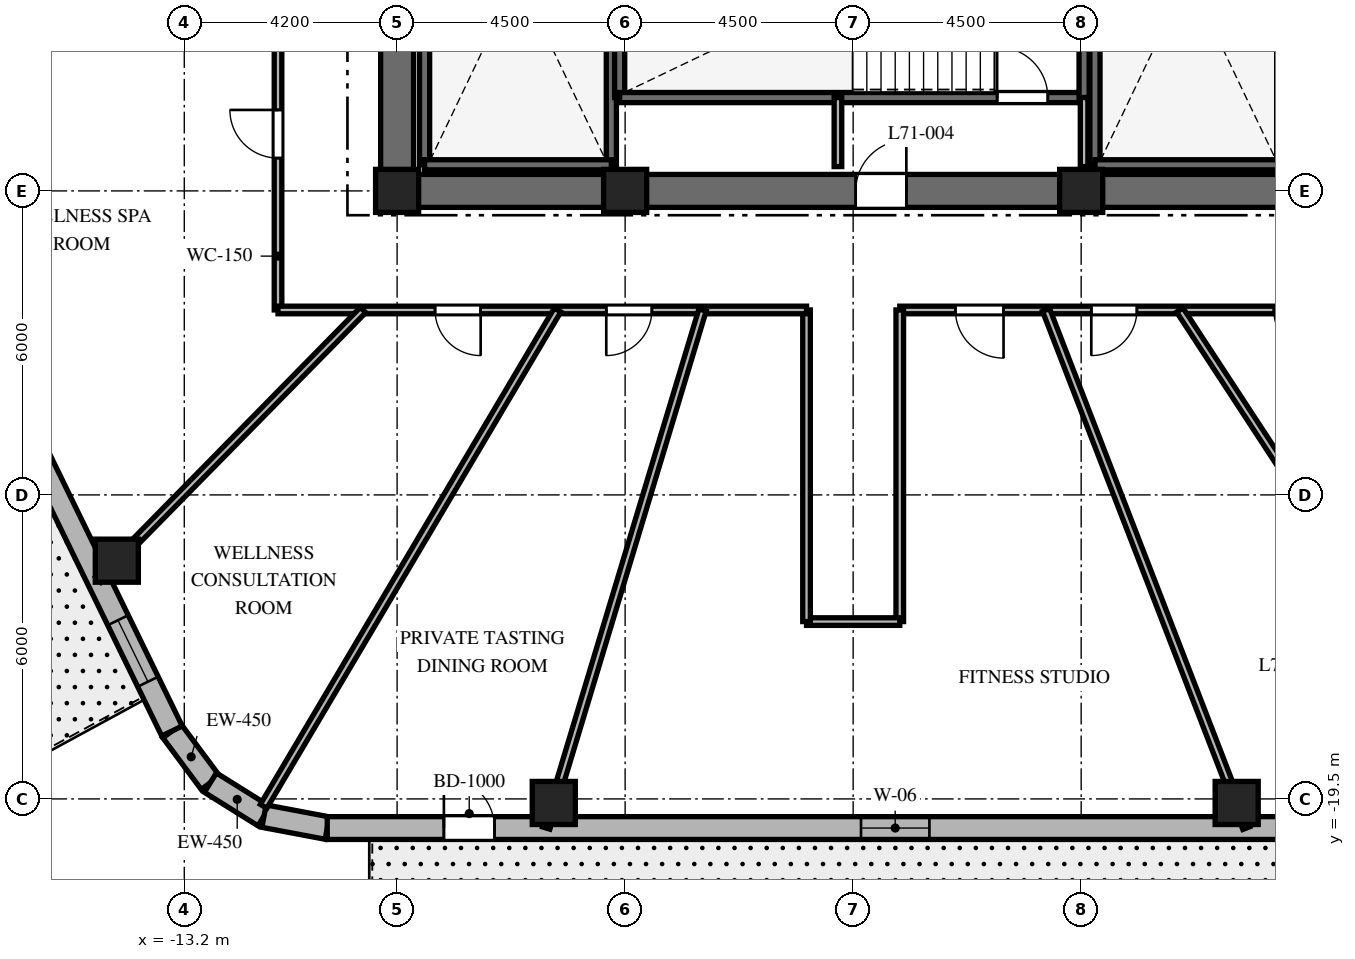
"""IFC4 building model, lengths in metres.
Left out: names, types, materials, properties, quantities, classifications, styles, units other than length and angle.
Written with IfcOpenShell. Run it as: python <this file> out.ifc"""

import sys

from ifc_helpers import new_model, si_unit, direction, frame, frame_2d, origin, origin_2d, place, context, subcontext, project, spatial, rectangle, extrude, element, fill, save


model = new_model("IFC4")
c1 = context("Model", 3, precision=1e-05, world=origin(), true_north=direction((0.0, 1.0)))
c2 = subcontext(c1, "Body", "Model", "MODEL_VIEW")
j1 = project(units=[si_unit("LENGTHUNIT", "METRE"), si_unit("PLANEANGLEUNIT", "RADIAN")], contexts=[c1])
p1 = place(None, origin())
s1 = spatial("IfcSite", under=j1, at=p1, CompositionType="ELEMENT")
p2 = place(p1, origin())
s2 = spatial("IfcBuilding", under=s1, at=p2, CompositionType="ELEMENT")
p3 = place(p2, frame((0.0, 0.0, 284.7)))
s3 = spatial("IfcBuildingStorey", under=s2, at=p3, CompositionType="ELEMENT", Elevation=284.7)
p4 = place(p3, frame((-9.325, -7.5, 0.0), z_axis=(0.0, 0.0, 1.0), x_axis=(1.0, 0.0, 0.0)))
e1 = element("IfcWall", 1, at=p4, inside=s3, PredefinedType="SHEAR", context=c2, shape_type="SweptSolid", body=[
    extrude(rectangle(XDim=18.65, YDim=0.65, at=frame_2d((9.325, 0.0))), origin(), (0.0, 0.0, 1.0), 3.9),
])
p5 = place(p4, frame((9.375, 0.0, 0.0)))
e2 = element("IfcOpeningElement", 2, at=p5, cuts=e1, PredefinedType="OPENING", context=c2, shape_type="SweptSolid", body=[
    extrude(rectangle(XDim=1.0, YDim=2.15, at=frame_2d((0.5, 1.075))), frame((0.0, 0.335, 0.0), z_axis=(0.0, -1.0, 0.0), x_axis=(1.0, 0.0, 0.0)), (0.0, 0.0, 1.0), 0.67),
])
p6 = place(p3, frame((-9.0, -7.175, 0.0), z_axis=(0.0, 0.0, 1.0), x_axis=(0.0, 1.0, 0.0)))
e3 = element("IfcWall", 3, at=p6, inside=s3, PredefinedType="SHEAR", context=c2, shape_type="SweptSolid", body=[
    extrude(rectangle(XDim=14.35, YDim=0.65, at=frame_2d((7.175, 0.0))), origin(), (0.0, 0.0, 1.0), 3.9),
])
p7 = place(p6, frame((10.3, 0.0, 0.0)))
e4 = element("IfcOpeningElement", 4, at=p7, cuts=e3, PredefinedType="OPENING", context=c2, shape_type="SweptSolid", body=[
    extrude(rectangle(XDim=1.05, YDim=2.15, at=frame_2d((0.525, 1.075))), frame((0.0, 0.335, 0.0), z_axis=(0.0, -1.0, 0.0), x_axis=(1.0, 0.0, 0.0)), (0.0, 0.0, 1.0), 0.67),
])
for number, where, z_axis, x_axis in (
    (5, (-8.458, -6.985, 0.0), (0.0, 0.0, 1.0), (0.0, 1.0, 0.0)),
    (6, (-4.772, -6.985, 0.0), (0.0, 0.0, 1.0), (0.0, 1.0, 0.0)),
):
    element("IfcWall", number, at=place(p3, frame(where, z_axis=z_axis, x_axis=x_axis)), inside=s3, PredefinedType="SHEAR", context=c2, shape_type="SweptSolid", body=[
        extrude(rectangle(XDim=9.143, YDim=0.2, at=frame_2d((4.572, 0.0))), origin(), (0.0, 0.0, 1.0), 3.9),
    ])
p8 = place(p3, frame((-8.458, -6.985, 0.0), z_axis=(0.0, 0.0, 1.0), x_axis=(1.0, 0.0, 0.0)))
e7 = element("IfcWall", 7, at=p8, inside=s3, PredefinedType="SHEAR", context=c2, shape_type="SweptSolid", body=[
    extrude(rectangle(XDim=3.686, YDim=0.2, at=frame_2d((1.843, 0.0))), origin(), (0.0, 0.0, 1.0), 3.9),
])
p9 = place(p3, frame((4.772, -6.985, 0.0), z_axis=(0.0, 0.0, 1.0), x_axis=(0.0, 1.0, 0.0)))
e8 = element("IfcWall", 8, at=p9, inside=s3, PredefinedType="SHEAR", context=c2, shape_type="SweptSolid", body=[
    extrude(rectangle(XDim=9.143, YDim=0.2, at=frame_2d((4.572, 0.0))), origin(), (0.0, 0.0, 1.0), 3.9),
])
for number, where, z_axis, x_axis in (
    (9, (4.772, -6.985, 0.0), (0.0, 0.0, 1.0), (1.0, 0.0, 0.0)),
    (10, (-4.608, -5.658, 0.0), (0.0, 0.0, 1.0), (0.0, 1.0, 0.0)),
):
    element("IfcWall", number, at=place(p3, frame(where, z_axis=z_axis, x_axis=x_axis)), inside=s3, PredefinedType="SHEAR", context=c2, shape_type="SweptSolid", body=[
        extrude(rectangle(XDim=3.686, YDim=0.2, at=frame_2d((1.843, 0.0))), origin(), (0.0, 0.0, 1.0), 3.9),
    ])
p10 = place(p3, frame((-4.608, -5.658, 0.0), z_axis=(0.0, 0.0, 1.0), x_axis=(1.0, 0.0, 0.0)))
e11 = element("IfcWall", 11, at=p10, inside=s3, PredefinedType="SHEAR", context=c2, shape_type="SweptSolid", body=[
    extrude(rectangle(XDim=9.166, YDim=0.2, at=frame_2d((4.583, 0.0))), origin(), (0.0, 0.0, 1.0), 3.9),
])
p11 = place(p10, frame((7.45, 0.0, 0.0)))
e12 = element("IfcOpeningElement", 12, at=p11, cuts=e11, PredefinedType="OPENING", context=c2, shape_type="SweptSolid", body=[
    extrude(rectangle(XDim=1.0, YDim=2.15, at=frame_2d((0.5, 1.075))), frame((0.0, 0.11, 0.0), z_axis=(0.0, -1.0, 0.0), x_axis=(1.0, 0.0, 0.0)), (0.0, 0.0, 1.0), 0.22),
])
p12 = place(p3, frame((4.558, -5.658, 0.0), z_axis=(0.0, 0.0, 1.0), x_axis=(0.0, 1.0, 0.0)))
e13 = element("IfcWall", 13, at=p12, inside=s3, PredefinedType="SHEAR", context=c2, shape_type="SweptSolid", body=[
    extrude(rectangle(XDim=3.686, YDim=0.2, at=frame_2d((1.843, 0.0))), origin(), (0.0, 0.0, 1.0), 3.9),
])
for number, where, z_axis, x_axis in (
    (14, (-9.0, -7.5, 0.0), (0.0, 0.0, 1.0), (1.0, 0.0, 0.0)),
    (15, (-4.5, -7.5, 0.0), (0.0, 0.0, 1.0), (1.0, 0.0, 0.0)),
    (16, (4.5, -7.5, 0.0), (0.0, 0.0, 1.0), (1.0, 0.0, 0.0)),
    (17, (-5.908, -19.58, 0.0), (0.0, 0.0, 1.0), (1.0, 0.0, 0.0)),
    (18, (7.569, -19.58, 0.0), (0.0, 0.0, 1.0), (1.0, 0.0, 0.0)),
    (19, (-14.531, -14.798, 0.0), (0.0, 0.0, 1.0), (1.0, 0.0, 0.0)),
):
    element("IfcColumn", number, at=place(p3, frame(where, z_axis=z_axis, x_axis=x_axis)), inside=s3, PredefinedType="COLUMN", context=c2, shape_type="SweptSolid", body=[
        extrude(rectangle(XDim=0.85, YDim=0.85, at=origin_2d()), origin(), (0.0, 0.0, 1.0), 3.9),
    ])
p13 = place(p3, frame((-13.443, -18.16, 0.0), z_axis=(0.0, 0.0, 1.0), x_axis=(0.597042425808, -0.802209661987, 0.0)))
e20 = element("IfcWall", 20, at=p13, inside=s3, PredefinedType="SOLIDWALL", context=c2, shape_type="SweptSolid", body=[
    extrude(rectangle(XDim=1.27, YDim=0.45, at=frame_2d((0.635, 0.0))), origin(), (0.0, 0.0, 1.0), 3.58),
])
p14 = place(p3, frame((-12.685, -19.178, 0.0), z_axis=(0.0, 0.0, 1.0), x_axis=(0.848031272749, -0.529946186362, 0.0)))
e21 = element("IfcWall", 21, at=p14, inside=s3, PredefinedType="SOLIDWALL", context=c2, shape_type="SweptSolid", body=[
    extrude(rectangle(XDim=1.248, YDim=0.45, at=frame_2d((0.624, 0.0))), origin(), (0.0, 0.0, 1.0), 3.58),
])
p15 = place(p3, frame((-11.626, -19.84, 0.0), z_axis=(0.0, 0.0, 1.0), x_axis=(0.982701956681, -0.185194126083, 0.0)))
e22 = element("IfcWall", 22, at=p15, inside=s3, PredefinedType="SOLIDWALL", context=c2, shape_type="SweptSolid", body=[
    extrude(rectangle(XDim=1.27, YDim=0.45, at=frame_2d((0.635, 0.0))), origin(), (0.0, 0.0, 1.0), 3.58),
])
p16 = place(p3, frame((-10.379, -20.075, 0.0), z_axis=(0.0, 0.0, 1.0), x_axis=(1.0, 0.0, 0.0)))
e23 = element("IfcWall", 23, at=p16, inside=s3, PredefinedType="SOLIDWALL", context=c2, shape_type="SweptSolid", body=[
    extrude(rectangle(XDim=22.417, YDim=0.45, at=frame_2d((11.208, 0.0))), origin(), (0.0, 0.0, 1.0), 3.58),
])
p17 = place(p16, frame((2.302, 0.0, 0.0)))
e24 = element("IfcOpeningElement", 24, at=p17, cuts=e23, PredefinedType="OPENING", context=c2, shape_type="SweptSolid", body=[
    extrude(rectangle(XDim=1.0, YDim=2.15, at=frame_2d((0.5, 1.075))), frame((0.0, 0.235, 0.0), z_axis=(0.0, -1.0, 0.0), x_axis=(1.0, 0.0, 0.0)), (0.0, 0.0, 1.0), 0.47),
])
p18 = place(p16, frame((10.534, 0.0, 0.8)))
e25 = element("IfcOpeningElement", 25, at=p18, cuts=e23, PredefinedType="OPENING", context=c2, shape_type="SweptSolid", body=[
    extrude(rectangle(XDim=1.35, YDim=1.75, at=frame_2d((0.675, 0.875))), frame((0.0, 0.235, 0.0), z_axis=(0.0, -1.0, 0.0), x_axis=(1.0, 0.0, 0.0)), (0.0, 0.0, 1.0), 0.47),
])
p19 = place(p16, frame((19.587, 0.0, 0.8)))
e26 = element("IfcOpeningElement", 26, at=p19, cuts=e23, PredefinedType="OPENING", context=c2, shape_type="SweptSolid", body=[
    extrude(rectangle(XDim=1.35, YDim=1.75, at=frame_2d((0.675, 0.875))), frame((0.0, 0.235, 0.0), z_axis=(0.0, -1.0, 0.0), x_axis=(1.0, 0.0, 0.0)), (0.0, 0.0, 1.0), 0.47),
])
p20 = place(p3, frame((-21.138, -2.371, 0.0), z_axis=(0.0, 0.0, 1.0), x_axis=(0.438128124058, -0.89891253574, 0.0)))
e27 = element("IfcWall", 27, at=p20, inside=s3, PredefinedType="SOLIDWALL", context=c2, shape_type="SweptSolid", body=[
    extrude(rectangle(XDim=17.565, YDim=0.45, at=frame_2d((8.782, 0.0))), origin(), (0.0, 0.0, 1.0), 3.58),
])
p21 = place(p20, frame((4.769, 0.0, 0.0)))
e28 = element("IfcOpeningElement", 28, at=p21, cuts=e27, PredefinedType="OPENING", context=c2, shape_type="SweptSolid", body=[
    extrude(rectangle(XDim=0.95, YDim=2.15, at=frame_2d((0.475, 1.075))), frame((0.0, 0.235, 0.0), z_axis=(0.0, -1.0, 0.0), x_axis=(1.0, 0.0, 0.0)), (0.0, 0.0, 1.0), 0.47),
])
p22 = place(p20, frame((1.133, 0.0, 0.8)))
e29 = element("IfcOpeningElement", 29, at=p22, cuts=e27, PredefinedType="OPENING", context=c2, shape_type="SweptSolid", body=[
    extrude(rectangle(XDim=1.35, YDim=1.75, at=frame_2d((0.675, 0.875))), frame((0.0, 0.235, 0.0), z_axis=(0.0, -1.0, 0.0), x_axis=(1.0, 0.0, 0.0)), (0.0, 0.0, 1.0), 0.47),
])
p23 = place(p20, frame((8.158, 0.0, 0.8)))
e30 = element("IfcOpeningElement", 30, at=p23, cuts=e27, PredefinedType="OPENING", context=c2, shape_type="SweptSolid", body=[
    extrude(rectangle(XDim=1.35, YDim=1.75, at=frame_2d((0.675, 0.875))), frame((0.0, 0.235, 0.0), z_axis=(0.0, -1.0, 0.0), x_axis=(1.0, 0.0, 0.0)), (0.0, 0.0, 1.0), 0.47),
])
p24 = place(p20, frame((15.132, 0.0, 0.8)))
e31 = element("IfcOpeningElement", 31, at=p24, cuts=e27, PredefinedType="OPENING", context=c2, shape_type="SweptSolid", body=[
    extrude(rectangle(XDim=1.35, YDim=1.75, at=frame_2d((0.675, 0.875))), frame((0.0, 0.235, 0.0), z_axis=(0.0, -1.0, 0.0), x_axis=(1.0, 0.0, 0.0)), (0.0, 0.0, 1.0), 0.47),
])
for number, where, z_axis, x_axis in (
    (32, (-0.3, -7.02, 0.0), (0.0, 0.0, 1.0), (0.0, 1.0, 0.0)),
    (33, (4.558, -7.02, 0.0), (0.0, 0.0, 1.0), (0.0, 1.0, 0.0)),
):
    element("IfcWall", number, at=place(p3, frame(where, z_axis=z_axis, x_axis=x_axis)), inside=s3, PredefinedType="PARTITIONING", context=c2, shape_type="SweptSolid", body=[
        extrude(rectangle(XDim=1.362, YDim=0.15, at=frame_2d((0.681, 0.0))), origin(), (0.0, 0.0, 1.0), 3.58),
    ])
p25 = place(p3, frame((-11.35, -9.85, 0.0), z_axis=(0.0, 0.0, 1.0), x_axis=(0.0, 1.0, 0.0)))
e34 = element("IfcWall", 34, at=p25, inside=s3, PredefinedType="PARTITIONING", context=c2, shape_type="SweptSolid", body=[
    extrude(rectangle(XDim=12.4, YDim=0.15, at=frame_2d((6.2, 0.0))), origin(), (0.0, 0.0, 1.0), 3.07),
])
p26 = place(p25, frame((10.026, 0.0, 0.0)))
e35 = element("IfcOpeningElement", 35, at=p26, cuts=e34, PredefinedType="OPENING", context=c2, shape_type="SweptSolid", body=[
    extrude(rectangle(XDim=0.9, YDim=2.03, at=frame_2d((0.45, 1.015))), frame((0.0, 0.085, 0.0), z_axis=(0.0, -1.0, 0.0), x_axis=(1.0, 0.0, 0.0)), (0.0, 0.0, 1.0), 0.17),
])
p27 = place(p25, frame((7.415, 0.0, 0.0)))
e36 = element("IfcOpeningElement", 36, at=p27, cuts=e34, PredefinedType="OPENING", context=c2, shape_type="SweptSolid", body=[
    extrude(rectangle(XDim=0.9, YDim=2.03, at=frame_2d((0.45, 1.015))), frame((0.0, 0.085, 0.0), z_axis=(0.0, -1.0, 0.0), x_axis=(1.0, 0.0, 0.0)), (0.0, 0.0, 1.0), 0.17),
])
p28 = place(p25, frame((2.998, 0.0, 0.0)))
e37 = element("IfcOpeningElement", 37, at=p28, cuts=e34, PredefinedType="OPENING", context=c2, shape_type="SweptSolid", body=[
    extrude(rectangle(XDim=0.95, YDim=2.03, at=frame_2d((0.475, 1.015))), frame((0.0, 0.085, 0.0), z_axis=(0.0, -1.0, 0.0), x_axis=(1.0, 0.0, 0.0)), (0.0, 0.0, 1.0), 0.17),
])
p29 = place(p3, frame((11.35, -9.85, 0.0), z_axis=(0.0, 0.0, 1.0), x_axis=(-1.0, 0.0, 0.0)))
e38 = element("IfcWall", 38, at=p29, inside=s3, PredefinedType="PARTITIONING", context=c2, shape_type="SweptSolid", body=[
    extrude(rectangle(XDim=10.43, YDim=0.15, at=frame_2d((5.215, 0.0))), origin(), (0.0, 0.0, 1.0), 3.07),
])
p30 = place(p29, frame((8.382, 0.0, 0.0)))
e39 = element("IfcOpeningElement", 39, at=p30, cuts=e38, PredefinedType="OPENING", context=c2, shape_type="SweptSolid", body=[
    extrude(rectangle(XDim=0.95, YDim=2.03, at=frame_2d((0.475, 1.015))), frame((0.0, 0.085, 0.0), z_axis=(0.0, -1.0, 0.0), x_axis=(1.0, 0.0, 0.0)), (0.0, 0.0, 1.0), 0.17),
])
p31 = place(p29, frame((5.75, 0.0, 0.0)))
e40 = element("IfcOpeningElement", 40, at=p31, cuts=e38, PredefinedType="OPENING", context=c2, shape_type="SweptSolid", body=[
    extrude(rectangle(XDim=0.9, YDim=2.03, at=frame_2d((0.45, 1.015))), frame((0.0, 0.085, 0.0), z_axis=(0.0, -1.0, 0.0), x_axis=(1.0, 0.0, 0.0)), (0.0, 0.0, 1.0), 0.17),
])
p32 = place(p29, frame((2.097, 0.0, 0.0)))
e41 = element("IfcOpeningElement", 41, at=p32, cuts=e38, PredefinedType="OPENING", context=c2, shape_type="SweptSolid", body=[
    extrude(rectangle(XDim=0.95, YDim=2.03, at=frame_2d((0.475, 1.015))), frame((0.0, 0.085, 0.0), z_axis=(0.0, -1.0, 0.0), x_axis=(1.0, 0.0, 0.0)), (0.0, 0.0, 1.0), 0.17),
])
p33 = place(p3, frame((0.92, -9.85, 0.0), z_axis=(0.0, 0.0, 1.0), x_axis=(0.0, -1.0, 0.0)))
e42 = element("IfcWall", 42, at=p33, inside=s3, PredefinedType="PARTITIONING", context=c2, shape_type="SweptSolid", body=[
    extrude(rectangle(XDim=6.15, YDim=0.15, at=frame_2d((3.075, 0.0))), origin(), (0.0, 0.0, 1.0), 3.021),
])
p34 = place(p3, frame((0.92, -16.0, 0.0), z_axis=(0.0, 0.0, 1.0), x_axis=(-1.0, 0.0, 0.0)))
e43 = element("IfcWall", 43, at=p34, inside=s3, PredefinedType="PARTITIONING", context=c2, shape_type="SweptSolid", body=[
    extrude(rectangle(XDim=1.84, YDim=0.15, at=frame_2d((0.92, 0.0))), origin(), (0.0, 0.0, 1.0), 3.58),
])
p35 = place(p3, frame((-0.92, -16.0, 0.0), z_axis=(0.0, 0.0, 1.0), x_axis=(0.0, 1.0, 0.0)))
e44 = element("IfcWall", 44, at=p35, inside=s3, PredefinedType="PARTITIONING", context=c2, shape_type="SweptSolid", body=[
    extrude(rectangle(XDim=6.15, YDim=0.15, at=frame_2d((3.075, 0.0))), origin(), (0.0, 0.0, 1.0), 3.021),
])
p36 = place(p3, frame((-0.92, -9.85, 0.0), z_axis=(0.0, 0.0, 1.0), x_axis=(-1.0, 0.0, 0.0)))
e45 = element("IfcWall", 45, at=p36, inside=s3, PredefinedType="PARTITIONING", context=c2, shape_type="SweptSolid", body=[
    extrude(rectangle(XDim=10.43, YDim=0.15, at=frame_2d((5.215, 0.0))), origin(), (0.0, 0.0, 1.0), 3.07),
])
p37 = place(p36, frame((6.431, 0.0, 0.0)))
e46 = element("IfcOpeningElement", 46, at=p37, cuts=e45, PredefinedType="OPENING", context=c2, shape_type="SweptSolid", body=[
    extrude(rectangle(XDim=0.9, YDim=2.03, at=frame_2d((0.45, 1.015))), frame((0.0, 0.085, 0.0), z_axis=(0.0, -1.0, 0.0), x_axis=(1.0, 0.0, 0.0)), (0.0, 0.0, 1.0), 0.17),
])
p38 = place(p36, frame((3.052, 0.0, 0.0)))
e47 = element("IfcOpeningElement", 47, at=p38, cuts=e45, PredefinedType="OPENING", context=c2, shape_type="SweptSolid", body=[
    extrude(rectangle(XDim=0.9, YDim=2.03, at=frame_2d((0.45, 1.015))), frame((0.0, 0.085, 0.0), z_axis=(0.0, -1.0, 0.0), x_axis=(1.0, 0.0, 0.0)), (0.0, 0.0, 1.0), 0.17),
])
p39 = place(p3, frame((-11.35, -3.143, 0.0), z_axis=(0.0, 0.0, 1.0), x_axis=(-0.963731818141, -0.266872596386, 0.0)))
e48 = element("IfcWall", 48, at=p39, inside=s3, PredefinedType="PARTITIONING", context=c2, shape_type="SweptSolid", body=[
    extrude(rectangle(XDim=8.605, YDim=0.15, at=frame_2d((4.302, 0.0))), origin(), (0.0, 0.0, 1.0), 2.92),
])
p40 = place(p3, frame((-9.672, -9.85, 0.0), z_axis=(0.0, 0.0, 1.0), x_axis=(-0.700629771301, -0.713524998558, 0.0)))
e49 = element("IfcWall", 49, at=p40, inside=s3, PredefinedType="PARTITIONING", context=c2, shape_type="SweptSolid", body=[
    extrude(rectangle(XDim=7.459, YDim=0.15, at=frame_2d((3.73, 0.0))), origin(), (0.0, 0.0, 1.0), 2.92),
])
p41 = place(p3, frame((-5.833, -9.85, 0.0), z_axis=(0.0, 0.0, 1.0), x_axis=(-0.509561365941, -0.860434317272, 0.0)))
e50 = element("IfcWall", 50, at=p41, inside=s3, PredefinedType="PARTITIONING", context=c2, shape_type="SweptSolid", body=[
    extrude(rectangle(XDim=11.385, YDim=0.15, at=frame_2d((5.692, 0.0))), origin(), (0.0, 0.0, 1.0), 2.92),
])
p42 = place(p3, frame((-2.972, -9.85, 0.0), z_axis=(0.0, 0.0, 1.0), x_axis=(-0.288872169679, -0.957367677324, 0.0)))
e51 = element("IfcWall", 51, at=p42, inside=s3, PredefinedType="PARTITIONING", context=c2, shape_type="SweptSolid", body=[
    extrude(rectangle(XDim=10.68, YDim=0.15, at=frame_2d((5.34, 0.0))), origin(), (0.0, 0.0, 1.0), 2.92),
])
p43 = place(p3, frame((3.808, -9.85, 0.0), z_axis=(0.0, 0.0, 1.0), x_axis=(0.360587327934, -0.932725457427, 0.0)))
e52 = element("IfcWall", 52, at=p43, inside=s3, PredefinedType="PARTITIONING", context=c2, shape_type="SweptSolid", body=[
    extrude(rectangle(XDim=10.962, YDim=0.15, at=frame_2d((5.481, 0.0))), origin(), (0.0, 0.0, 1.0), 2.92),
])
p44 = place(p3, frame((6.446, -9.85, 0.0), z_axis=(0.0, 0.0, 1.0), x_axis=(0.547598105704, -0.836741486141, 0.0)))
e53 = element("IfcWall", 53, at=p44, inside=s3, PredefinedType="PARTITIONING", context=c2, shape_type="SweptSolid", body=[
    extrude(rectangle(XDim=11.806, YDim=0.15, at=frame_2d((5.903, 0.0))), origin(), (0.0, 0.0, 1.0), 2.92),
])
p45 = place(p17, origin())
e54 = element("IfcDoor", 54, at=p45, inside=s3, OperationType="SINGLE_SWING_LEFT", PredefinedType="DOOR", context=c2, shape_type="SweptSolid", body=[
    extrude(rectangle(XDim=1.0, YDim=2.15, at=frame_2d((0.5, 1.075))), frame((0.0, 0.025, 0.0), z_axis=(0.0, -1.0, 0.0), x_axis=(1.0, 0.0, 0.0)), (0.0, 0.0, 1.0), 0.05),
])
fill(e24, e54)
p46 = place(p18, origin())
e55 = element("IfcWindow", 55, at=p46, inside=s3, PartitioningType="SINGLE_PANEL", PredefinedType="WINDOW", context=c2, shape_type="SweptSolid", body=[
    extrude(rectangle(XDim=1.35, YDim=1.75, at=frame_2d((0.675, 0.875))), frame((0.0, 0.03, 0.0), z_axis=(0.0, -1.0, 0.0), x_axis=(1.0, 0.0, 0.0)), (0.0, 0.0, 1.0), 0.06),
])
fill(e25, e55)
p47 = place(p24, origin())
e56 = element("IfcWindow", 56, at=p47, inside=s3, PartitioningType="SINGLE_PANEL", PredefinedType="WINDOW", context=c2, shape_type="SweptSolid", body=[
    extrude(rectangle(XDim=1.35, YDim=1.75, at=frame_2d((0.675, 0.875))), frame((0.0, 0.03, 0.0), z_axis=(0.0, -1.0, 0.0), x_axis=(1.0, 0.0, 0.0)), (0.0, 0.0, 1.0), 0.06),
])
fill(e31, e56)
p48 = place(p11, origin())
e57 = element("IfcDoor", 57, at=p48, inside=s3, OperationType="SINGLE_SWING_LEFT", PredefinedType="DOOR", context=c2, shape_type="SweptSolid", body=[
    extrude(rectangle(XDim=1.0, YDim=2.15, at=frame_2d((0.5, 1.075))), frame((0.0, 0.025, 0.0), z_axis=(0.0, -1.0, 0.0), x_axis=(1.0, 0.0, 0.0)), (0.0, 0.0, 1.0), 0.05),
])
fill(e12, e57)
p49 = place(p5, origin())
e58 = element("IfcDoor", 58, at=p49, inside=s3, OperationType="SINGLE_SWING_RIGHT", PredefinedType="DOOR", context=c2, shape_type="SweptSolid", body=[
    extrude(rectangle(XDim=1.0, YDim=2.15, at=frame_2d((0.5, 1.075))), frame((0.0, 0.025, 0.0), z_axis=(0.0, -1.0, 0.0), x_axis=(1.0, 0.0, 0.0)), (0.0, 0.0, 1.0), 0.05),
])
fill(e2, e58)
p50 = place(p28, origin())
e59 = element("IfcDoor", 59, at=p50, inside=s3, OperationType="SINGLE_SWING_RIGHT", PredefinedType="DOOR", context=c2, shape_type="SweptSolid", body=[
    extrude(rectangle(XDim=0.95, YDim=2.03, at=frame_2d((0.475, 1.015))), frame((0.0, 0.025, 0.0), z_axis=(0.0, -1.0, 0.0), x_axis=(1.0, 0.0, 0.0)), (0.0, 0.0, 1.0), 0.05),
])
fill(e37, e59)
p51 = place(p37, origin())
e60 = element("IfcDoor", 60, at=p51, inside=s3, OperationType="SINGLE_SWING_LEFT", PredefinedType="DOOR", context=c2, shape_type="SweptSolid", body=[
    extrude(rectangle(XDim=0.9, YDim=2.03, at=frame_2d((0.45, 1.015))), frame((0.0, 0.025, 0.0), z_axis=(0.0, -1.0, 0.0), x_axis=(1.0, 0.0, 0.0)), (0.0, 0.0, 1.0), 0.05),
])
fill(e46, e60)
p52 = place(p38, origin())
e61 = element("IfcDoor", 61, at=p52, inside=s3, OperationType="SINGLE_SWING_RIGHT", PredefinedType="DOOR", context=c2, shape_type="SweptSolid", body=[
    extrude(rectangle(XDim=0.9, YDim=2.03, at=frame_2d((0.45, 1.015))), frame((0.0, 0.025, 0.0), z_axis=(0.0, -1.0, 0.0), x_axis=(1.0, 0.0, 0.0)), (0.0, 0.0, 1.0), 0.05),
])
fill(e47, e61)
p53 = place(p30, origin())
e62 = element("IfcDoor", 62, at=p53, inside=s3, OperationType="SINGLE_SWING_LEFT", PredefinedType="DOOR", context=c2, shape_type="SweptSolid", body=[
    extrude(rectangle(XDim=0.95, YDim=2.03, at=frame_2d((0.475, 1.015))), frame((0.0, 0.025, 0.0), z_axis=(0.0, -1.0, 0.0), x_axis=(1.0, 0.0, 0.0)), (0.0, 0.0, 1.0), 0.05),
])
fill(e39, e62)
p54 = place(p31, origin())
e63 = element("IfcDoor", 63, at=p54, inside=s3, OperationType="SINGLE_SWING_RIGHT", PredefinedType="DOOR", context=c2, shape_type="SweptSolid", body=[
    extrude(rectangle(XDim=0.9, YDim=2.03, at=frame_2d((0.45, 1.015))), frame((0.0, 0.025, 0.0), z_axis=(0.0, -1.0, 0.0), x_axis=(1.0, 0.0, 0.0)), (0.0, 0.0, 1.0), 0.05),
])
fill(e40, e63)
p55 = place(p32, origin())
e64 = element("IfcDoor", 64, at=p55, inside=s3, OperationType="SINGLE_SWING_LEFT", PredefinedType="DOOR", context=c2, shape_type="SweptSolid", body=[
    extrude(rectangle(XDim=0.95, YDim=2.03, at=frame_2d((0.475, 1.015))), frame((0.0, 0.025, 0.0), z_axis=(0.0, -1.0, 0.0), x_axis=(1.0, 0.0, 0.0)), (0.0, 0.0, 1.0), 0.05),
])
fill(e41, e64)
save(model, sys.argv[1])
